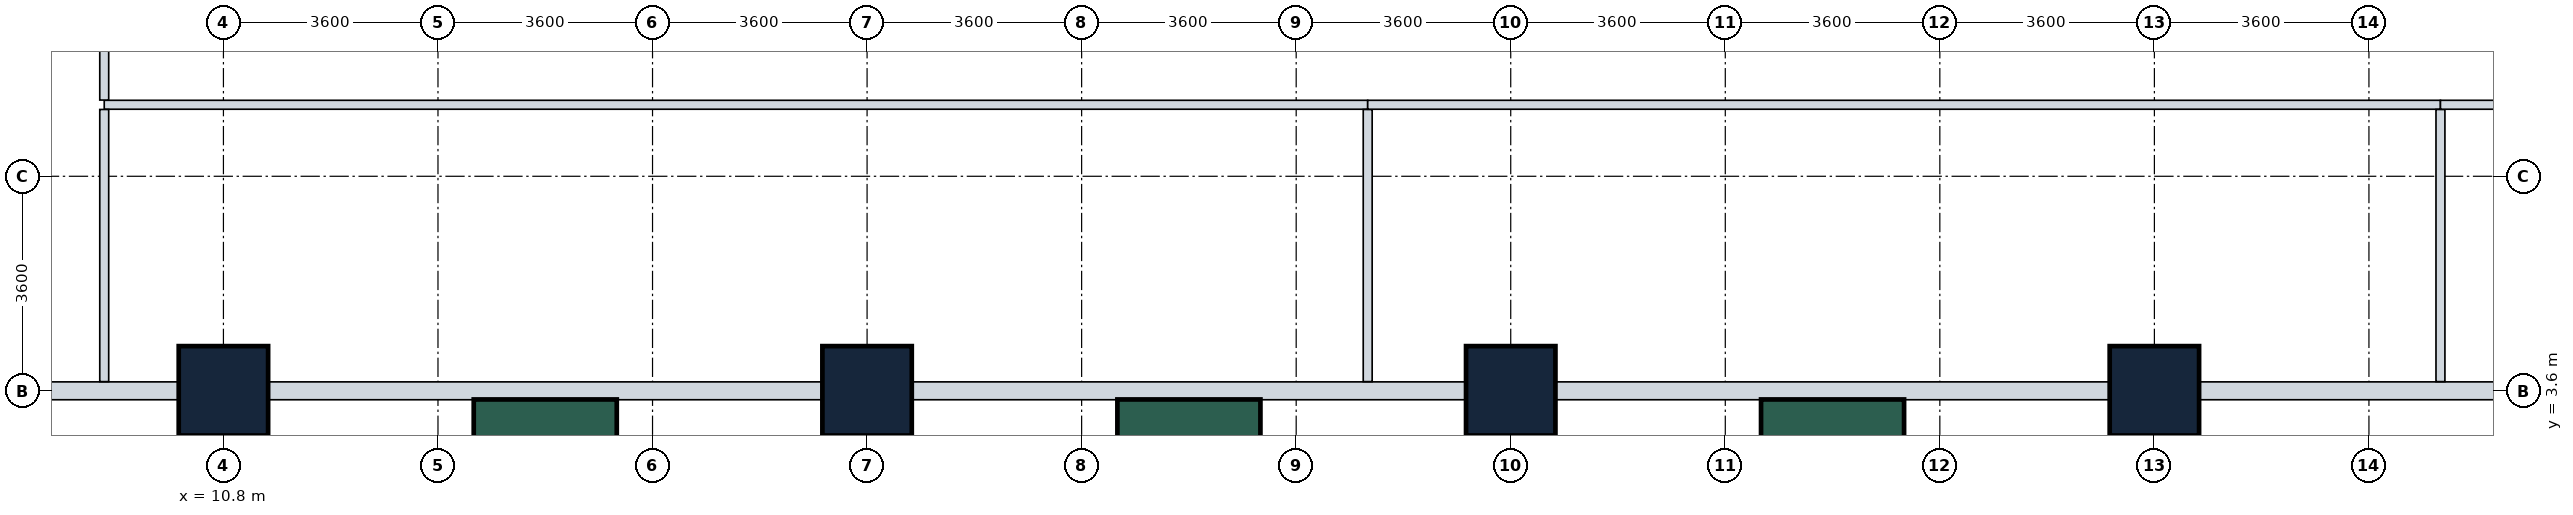
"""IFC4 building model, lengths in metres.
Left out: names, types, materials, properties, quantities, classifications, styles, units other than length and angle.
Written with IfcOpenShell. Run it as: python <this file> out.ifc"""

import sys

from ifc_helpers import new_model, si_unit, direction, frame, frame_2d, origin, origin_2d, place, context, subcontext, project, spatial, rectangle, extrude, element, fill, save


model = new_model("IFC4")
c1 = context("Model", 3, precision=1e-05, world=origin(), true_north=direction((0.0, 1.0)))
c2 = subcontext(c1, "Body", "Model", "MODEL_VIEW")
j1 = project(units=[si_unit("LENGTHUNIT", "METRE"), si_unit("PLANEANGLEUNIT", "RADIAN")], contexts=[c1])
p1 = place(None, origin())
s1 = spatial("IfcSite", under=j1, at=p1, CompositionType="ELEMENT")
p2 = place(p1, origin())
s2 = spatial("IfcBuilding", under=s1, at=p2, CompositionType="ELEMENT")
p3 = place(p2, frame((0.0, 0.0, 19.4)))
s3 = spatial("IfcBuildingStorey", under=s2, at=p3, CompositionType="ELEMENT", Elevation=19.4)
for number, where, z_axis, x_axis in (
    (1, (10.8, 3.6, 0.0), (0.0, 0.0, 1.0), (1.0, 0.0, 0.0)),
    (2, (21.6, 3.6, 0.0), (0.0, 0.0, 1.0), (1.0, 0.0, 0.0)),
    (3, (32.4, 3.6, 0.0), (0.0, 0.0, 1.0), (1.0, 0.0, 0.0)),
    (4, (43.2, 3.6, 0.0), (0.0, 0.0, 1.0), (1.0, 0.0, 0.0)),
):
    element("IfcColumn", number, at=place(p3, frame(where, z_axis=z_axis, x_axis=x_axis)), inside=s3, PredefinedType="COLUMN", context=c2, shape_type="SweptSolid", body=[
        extrude(rectangle(XDim=1.5, YDim=1.5, at=origin_2d()), origin(), (0.0, 0.0, 1.0), 4.6),
    ])
p4 = place(p3, frame((10.8, 3.6, 0.0), z_axis=(0.0, 0.0, 1.0), x_axis=(-1.0, 0.0, 0.0)))
e5 = element("IfcWall", 5, at=p4, inside=s3, PredefinedType="STANDARD", context=c2, shape_type="SweptSolid", body=[
    extrude(rectangle(XDim=10.8, YDim=0.3, at=frame_2d((5.4, 0.0))), origin(), (0.0, 0.0, 1.0), 3.23),
])
p5 = place(p4, frame((4.2, 0.0, 0.85)))
e6 = element("IfcOpeningElement", 6, at=p5, cuts=e5, PredefinedType="OPENING", context=c2, shape_type="SweptSolid", body=[
    extrude(rectangle(XDim=2.4, YDim=1.6, at=frame_2d((1.2, 0.8))), frame((0.0, 0.16, 0.0), z_axis=(0.0, -1.0, 0.0), x_axis=(1.0, 0.0, 0.0)), (0.0, 0.0, 1.0), 0.32),
])
p6 = place(p3, frame((21.6, 3.6, 0.0), z_axis=(0.0, 0.0, 1.0), x_axis=(-1.0, 0.0, 0.0)))
e7 = element("IfcWall", 7, at=p6, inside=s3, PredefinedType="STANDARD", context=c2, shape_type="SweptSolid", body=[
    extrude(rectangle(XDim=10.8, YDim=0.3, at=frame_2d((5.4, 0.0))), origin(), (0.0, 0.0, 1.0), 3.23),
])
p7 = place(p6, frame((4.2, 0.0, 0.85)))
e8 = element("IfcOpeningElement", 8, at=p7, cuts=e7, PredefinedType="OPENING", context=c2, shape_type="SweptSolid", body=[
    extrude(rectangle(XDim=2.4, YDim=1.6, at=frame_2d((1.2, 0.8))), frame((0.0, 0.16, 0.0), z_axis=(0.0, -1.0, 0.0), x_axis=(1.0, 0.0, 0.0)), (0.0, 0.0, 1.0), 0.32),
])
p8 = place(p3, frame((32.4, 3.6, 0.0), z_axis=(0.0, 0.0, 1.0), x_axis=(-1.0, 0.0, 0.0)))
e9 = element("IfcWall", 9, at=p8, inside=s3, PredefinedType="STANDARD", context=c2, shape_type="SweptSolid", body=[
    extrude(rectangle(XDim=10.8, YDim=0.3, at=frame_2d((5.4, 0.0))), origin(), (0.0, 0.0, 1.0), 3.23),
])
p9 = place(p8, frame((4.2, 0.0, 0.85)))
e10 = element("IfcOpeningElement", 10, at=p9, cuts=e9, PredefinedType="OPENING", context=c2, shape_type="SweptSolid", body=[
    extrude(rectangle(XDim=2.4, YDim=1.6, at=frame_2d((1.2, 0.8))), frame((0.0, 0.16, 0.0), z_axis=(0.0, -1.0, 0.0), x_axis=(1.0, 0.0, 0.0)), (0.0, 0.0, 1.0), 0.32),
])
p10 = place(p3, frame((43.2, 3.6, 0.0), z_axis=(0.0, 0.0, 1.0), x_axis=(-1.0, 0.0, 0.0)))
e11 = element("IfcWall", 11, at=p10, inside=s3, PredefinedType="STANDARD", context=c2, shape_type="SweptSolid", body=[
    extrude(rectangle(XDim=10.8, YDim=0.3, at=frame_2d((5.4, 0.0))), origin(), (0.0, 0.0, 1.0), 3.23),
])
p11 = place(p10, frame((4.2, 0.0, 0.85)))
e12 = element("IfcOpeningElement", 12, at=p11, cuts=e11, PredefinedType="OPENING", context=c2, shape_type="SweptSolid", body=[
    extrude(rectangle(XDim=2.4, YDim=1.6, at=frame_2d((1.2, 0.8))), frame((0.0, 0.16, 0.0), z_axis=(0.0, -1.0, 0.0), x_axis=(1.0, 0.0, 0.0)), (0.0, 0.0, 1.0), 0.32),
])
p12 = place(p3, frame((54.0, 3.6, 0.0), z_axis=(0.0, 0.0, 1.0), x_axis=(-1.0, 0.0, 0.0)))
e13 = element("IfcWall", 13, at=p12, inside=s3, PredefinedType="STANDARD", context=c2, shape_type="SweptSolid", body=[
    extrude(rectangle(XDim=10.8, YDim=0.3, at=frame_2d((5.4, 0.0))), origin(), (0.0, 0.0, 1.0), 3.23),
])
p13 = place(p3, frame((8.8, 8.4, 0.0), z_axis=(0.0, 0.0, 1.0), x_axis=(1.0, 0.0, 0.0)))
e14 = element("IfcWall", 14, at=p13, inside=s3, PredefinedType="PARTITIONING", context=c2, shape_type="SweptSolid", body=[
    extrude(rectangle(XDim=21.2, YDim=0.15, at=frame_2d((10.6, 0.0))), origin(), (0.0, 0.0, 1.0), 3.23),
])
p14 = place(p13, frame((9.241, 0.0, 0.0)))
e15 = element("IfcOpeningElement", 15, at=p14, cuts=e14, PredefinedType="OPENING", context=c2, shape_type="SweptSolid", body=[
    extrude(rectangle(XDim=1.6, YDim=2.2, at=frame_2d((0.8, 1.1))), frame((0.0, 0.085, 0.0), z_axis=(0.0, -1.0, 0.0), x_axis=(1.0, 0.0, 0.0)), (0.0, 0.0, 1.0), 0.17),
])
p15 = place(p3, frame((30.0, 3.754, 0.0), z_axis=(0.0, 0.0, 1.0), x_axis=(0.0, 1.0, 0.0)))
e16 = element("IfcWall", 16, at=p15, inside=s3, PredefinedType="PARTITIONING", context=c2, shape_type="SweptSolid", body=[
    extrude(rectangle(XDim=4.567, YDim=0.15, at=frame_2d((2.284, 0.0))), origin(), (0.0, 0.0, 1.0), 3.23),
])
p16 = place(p3, frame((30.0, 8.4, 0.0), z_axis=(0.0, 0.0, 1.0), x_axis=(1.0, 0.0, 0.0)))
e17 = element("IfcWall", 17, at=p16, inside=s3, PredefinedType="PARTITIONING", context=c2, shape_type="SweptSolid", body=[
    extrude(rectangle(XDim=18.0, YDim=0.15, at=frame_2d((9.0, 0.0))), origin(), (0.0, 0.0, 1.0), 3.23),
])
p17 = place(p16, frame((8.2, 0.0, 0.0)))
e18 = element("IfcOpeningElement", 18, at=p17, cuts=e17, PredefinedType="OPENING", context=c2, shape_type="SweptSolid", body=[
    extrude(rectangle(XDim=1.6, YDim=2.2, at=frame_2d((0.8, 1.1))), frame((0.0, 0.085, 0.0), z_axis=(0.0, -1.0, 0.0), x_axis=(1.0, 0.0, 0.0)), (0.0, 0.0, 1.0), 0.17),
])
p18 = place(p3, frame((48.0, 3.754, 0.0), z_axis=(0.0, 0.0, 1.0), x_axis=(0.0, 1.0, 0.0)))
e19 = element("IfcWall", 19, at=p18, inside=s3, PredefinedType="PARTITIONING", context=c2, shape_type="SweptSolid", body=[
    extrude(rectangle(XDim=4.567, YDim=0.15, at=frame_2d((2.284, 0.0))), origin(), (0.0, 0.0, 1.0), 3.23),
])
p19 = place(p3, frame((48.0, 8.4, 0.0), z_axis=(0.0, 0.0, 1.0), x_axis=(1.0, 0.0, 0.0)))
e20 = element("IfcWall", 20, at=p19, inside=s3, PredefinedType="PARTITIONING", context=c2, shape_type="SweptSolid", body=[
    extrude(rectangle(XDim=11.6, YDim=0.15, at=frame_2d((5.8, 0.0))), origin(), (0.0, 0.0, 1.0), 3.23),
])
p20 = place(p19, frame((2.212, 0.0, 0.0)))
e21 = element("IfcOpeningElement", 21, at=p20, cuts=e20, PredefinedType="OPENING", context=c2, shape_type="SweptSolid", body=[
    extrude(rectangle(XDim=1.6, YDim=2.2, at=frame_2d((0.8, 1.1))), frame((0.0, 0.085, 0.0), z_axis=(0.0, -1.0, 0.0), x_axis=(1.0, 0.0, 0.0)), (0.0, 0.0, 1.0), 0.17),
])
p21 = place(p3, frame((8.8, 3.754, 0.0), z_axis=(0.0, 0.0, 1.0), x_axis=(0.0, 1.0, 0.0)))
e22 = element("IfcWall", 22, at=p21, inside=s3, PredefinedType="PARTITIONING", context=c2, shape_type="SweptSolid", body=[
    extrude(rectangle(XDim=4.567, YDim=0.15, at=frame_2d((2.284, 0.0))), origin(), (0.0, 0.0, 1.0), 3.23),
])
p22 = place(p3, frame((8.8, 8.479, 0.0), z_axis=(0.0, 0.0, 1.0), x_axis=(0.0, 1.0, 0.0)))
e23 = element("IfcWall", 23, at=p22, inside=s3, PredefinedType="PARTITIONING", context=c2, shape_type="SweptSolid", body=[
    extrude(rectangle(XDim=10.721, YDim=0.15, at=frame_2d((5.36, 0.0))), origin(), (0.0, 0.0, 1.0), 3.23),
])
p23 = place(p22, frame((5.101, 0.0, 0.0)))
e24 = element("IfcOpeningElement", 24, at=p23, cuts=e23, PredefinedType="OPENING", context=c2, shape_type="SweptSolid", body=[
    extrude(rectangle(XDim=1.0, YDim=2.1, at=frame_2d((0.5, 1.05))), frame((0.0, 0.085, 0.0), z_axis=(0.0, -1.0, 0.0), x_axis=(1.0, 0.0, 0.0)), (0.0, 0.0, 1.0), 0.17),
])
p24 = place(p7, origin())
e25 = element("IfcWindow", 25, at=p24, inside=s3, PartitioningType="SINGLE_PANEL", PredefinedType="WINDOW", context=c2, shape_type="SweptSolid", body=[
    extrude(rectangle(XDim=2.4, YDim=1.6, at=frame_2d((1.2, 0.8))), frame((0.0, 0.03, 0.0), z_axis=(0.0, -1.0, 0.0), x_axis=(1.0, 0.0, 0.0)), (0.0, 0.0, 1.0), 0.06),
])
fill(e8, e25)
p25 = place(p9, origin())
e26 = element("IfcWindow", 26, at=p25, inside=s3, PartitioningType="SINGLE_PANEL", PredefinedType="WINDOW", context=c2, shape_type="SweptSolid", body=[
    extrude(rectangle(XDim=2.4, YDim=1.6, at=frame_2d((1.2, 0.8))), frame((0.0, 0.03, 0.0), z_axis=(0.0, -1.0, 0.0), x_axis=(1.0, 0.0, 0.0)), (0.0, 0.0, 1.0), 0.06),
])
fill(e10, e26)
p26 = place(p11, origin())
e27 = element("IfcWindow", 27, at=p26, inside=s3, PartitioningType="SINGLE_PANEL", PredefinedType="WINDOW", context=c2, shape_type="SweptSolid", body=[
    extrude(rectangle(XDim=2.4, YDim=1.6, at=frame_2d((1.2, 0.8))), frame((0.0, 0.03, 0.0), z_axis=(0.0, -1.0, 0.0), x_axis=(1.0, 0.0, 0.0)), (0.0, 0.0, 1.0), 0.06),
])
fill(e12, e27)
p27 = place(p14, origin())
e28 = element("IfcDoor", 28, at=p27, inside=s3, OperationType="DOUBLE_DOOR_SINGLE_SWING", PredefinedType="DOOR", context=c2, shape_type="SweptSolid", body=[
    extrude(rectangle(XDim=1.6, YDim=2.2, at=frame_2d((0.8, 1.1))), frame((0.0, 0.025, 0.0), z_axis=(0.0, -1.0, 0.0), x_axis=(1.0, 0.0, 0.0)), (0.0, 0.0, 1.0), 0.05),
])
fill(e15, e28)
p28 = place(p17, origin())
e29 = element("IfcDoor", 29, at=p28, inside=s3, OperationType="DOUBLE_DOOR_SINGLE_SWING", PredefinedType="DOOR", context=c2, shape_type="SweptSolid", body=[
    extrude(rectangle(XDim=1.6, YDim=2.2, at=frame_2d((0.8, 1.1))), frame((0.0, 0.025, 0.0), z_axis=(0.0, -1.0, 0.0), x_axis=(1.0, 0.0, 0.0)), (0.0, 0.0, 1.0), 0.05),
])
fill(e18, e29)
save(model, sys.argv[1])
